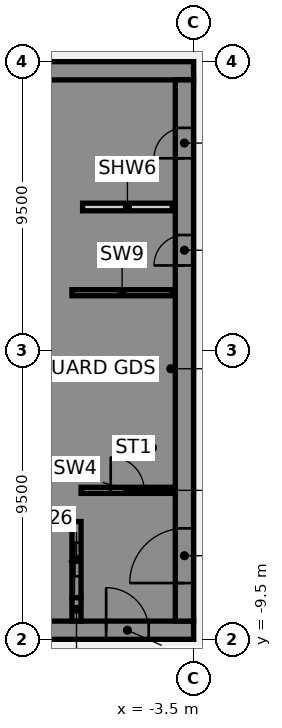
"""IFC4 building model, lengths in metres.
Left out: names, types, materials, properties, quantities, classifications, styles, units other than length and angle.
Written with IfcOpenShell. Run it as: python <this file> out.ifc"""

import sys

from ifc_helpers import new_model, si_unit, direction, frame, frame_2d, origin, place, context, subcontext, project, spatial, polyline, rectangle, outline, extrude, element, fill, save


model = new_model("IFC4")
c1 = context("Model", 3, precision=1e-05, world=origin(), true_north=direction((0.0, 1.0)))
c2 = subcontext(c1, "Body", "Model", "MODEL_VIEW")
j1 = project(units=[si_unit("LENGTHUNIT", "METRE"), si_unit("PLANEANGLEUNIT", "RADIAN")], contexts=[c1])
p1 = place(None, origin())
s1 = spatial("IfcSite", under=j1, at=p1, CompositionType="ELEMENT")
p2 = place(p1, origin())
s2 = spatial("IfcBuilding", under=s1, at=p2, CompositionType="ELEMENT")
p3 = place(p2, frame((0.0, 0.0, 109.75)))
s3 = spatial("IfcBuildingStorey", under=s2, at=p3, CompositionType="ELEMENT", Elevation=109.75)
p4 = place(p3, frame((-16.5, -9.2, 0.0), z_axis=(0.0, 0.0, 1.0), x_axis=(1.0, 0.0, 0.0)))
e1 = element("IfcWall", 1, at=p4, inside=s3, PredefinedType="SHEAR", context=c2, shape_type="SweptSolid", body=[
    extrude(rectangle(XDim=13.0, YDim=0.6, at=frame_2d((6.5, 0.0))), origin(), (0.0, 0.0, 1.0), 3.61),
])
p5 = place(p4, frame((4.15, 0.0, 0.0)))
e2 = element("IfcOpeningElement", 2, at=p5, cuts=e1, PredefinedType="OPENING", context=c2, shape_type="SweptSolid", body=[
    extrude(rectangle(XDim=1.4, YDim=2.1, at=frame_2d((0.7, 1.05))), frame((0.0, 0.31, 0.0), z_axis=(0.0, -1.0, 0.0), x_axis=(1.0, 0.0, 0.0)), (0.0, 0.0, 1.0), 0.62),
])
p6 = place(p4, frame((10.125, 0.0, 0.0)))
e3 = element("IfcOpeningElement", 3, at=p6, cuts=e1, PredefinedType="OPENING", context=c2, shape_type="SweptSolid", body=[
    extrude(rectangle(XDim=1.4, YDim=2.1, at=frame_2d((0.7, 1.05))), frame((0.0, 0.31, 0.0), z_axis=(0.0, -1.0, 0.0), x_axis=(1.0, 0.0, 0.0)), (0.0, 0.0, 1.0), 0.62),
])
p7 = place(p3, frame((-16.5, 9.2, 0.0), z_axis=(0.0, 0.0, 1.0), x_axis=(1.0, 0.0, 0.0)))
e4 = element("IfcWall", 4, at=p7, inside=s3, PredefinedType="SHEAR", context=c2, shape_type="SweptSolid", body=[
    extrude(rectangle(XDim=13.0, YDim=0.6, at=frame_2d((6.5, 0.0))), origin(), (0.0, 0.0, 1.0), 3.61),
])
p8 = place(p3, origin())
e5 = element("IfcWall", 5, at=p8, inside=s3, PredefinedType="SHEAR", context=c2, shape_type="SweptSolid", body=[
    extrude(outline(polyline([(-9.8, -5.375), (-9.8, -5.625), (-7.5, -5.625), (-7.2, -5.625), (-7.2, 8.9), (-7.5, 8.9), (-9.8, 8.9), (-9.8, 8.125), (-7.5, 8.125), (-7.5, 5.625), (-9.8, 5.625), (-9.8, 5.375), (-7.5, 5.375), (-7.5, 2.875), (-9.8, 2.875), (-9.8, 2.625), (-7.5, 2.625), (-7.5, 0.125), (-9.8, 0.125), (-9.8, -0.125), (-7.5, -0.125), (-7.5, -2.625), (-9.8, -2.625), (-9.8, -2.875), (-7.5, -2.875), (-7.5, -5.375), (-9.8, -5.375)])), origin(), (0.0, 0.0, 1.0), 3.61),
])
p9 = place(p3, origin())
e6 = element("IfcWall", 6, at=p9, inside=s3, PredefinedType="SHEAR", context=c2, shape_type="SweptSolid", body=[
    extrude(outline(polyline([(-7.5, -8.125), (-9.55, -8.125), (-9.55, -5.625), (-9.8, -5.625), (-9.8, -8.125), (-9.8, -8.9), (-7.5, -8.9), (-7.5, -8.125)])), origin(), (0.0, 0.0, 1.0), 3.61),
])
p10 = place(p3, frame((-7.35, -8.9, 0.0), z_axis=(0.0, 0.0, 1.0), x_axis=(0.0, 1.0, 0.0)))
e7 = element("IfcWall", 7, at=p10, inside=s3, PredefinedType="SHEAR", context=c2, shape_type="SweptSolid", body=[
    extrude(rectangle(XDim=0.775, YDim=0.3, at=frame_2d((0.387, 0.0))), origin(), (0.0, 0.0, 1.0), 3.61),
])
p11 = place(p3, frame((-7.5, 1.9, 0.0), z_axis=(0.0, 0.0, 1.0), x_axis=(1.0, 0.0, 0.0)))
e8 = element("IfcWall", 8, at=p11, inside=s3, PredefinedType="SHEAR", context=c2, shape_type="SweptSolid", body=[
    extrude(rectangle(XDim=3.3, YDim=0.2, at=frame_2d((1.65, 0.0))), origin(), (0.0, 0.0, 1.0), 3.61),
])
p12 = place(p3, frame((-7.35, -8.125, 0.0), z_axis=(0.0, 0.0, 1.0), x_axis=(0.0, 1.0, 0.0)))
e9 = element("IfcWall", 9, at=p12, inside=s3, PredefinedType="SHEAR", context=c2, shape_type="SweptSolid", body=[
    extrude(rectangle(XDim=2.5, YDim=0.3, at=frame_2d((1.25, 0.0))), origin(), (0.0, 0.0, 1.0), 3.61),
])
p13 = place(p12, frame((0.7, 0.0, 0.0)))
e10 = element("IfcOpeningElement", 10, at=p13, cuts=e9, PredefinedType="OPENING", context=c2, shape_type="SweptSolid", body=[
    extrude(rectangle(XDim=1.1, YDim=2.1, at=frame_2d((0.55, 1.05))), frame((0.0, 0.16, 0.0), z_axis=(0.0, -1.0, 0.0), x_axis=(1.0, 0.0, 0.0)), (0.0, 0.0, 1.0), 0.32),
])
p14 = place(p3, frame((-3.8, -8.9, 0.0), z_axis=(0.0, 0.0, 1.0), x_axis=(0.0, 1.0, 0.0)))
e11 = element("IfcWall", 11, at=p14, inside=s3, PredefinedType="SHEAR", context=c2, shape_type="SweptSolid", body=[
    extrude(rectangle(XDim=17.8, YDim=0.6, at=frame_2d((8.9, 0.0))), origin(), (0.0, 0.0, 1.0), 3.61),
])
p15 = place(p14, frame((1.25, 0.0, 0.0)))
e12 = element("IfcOpeningElement", 12, at=p15, cuts=e11, PredefinedType="OPENING", context=c2, shape_type="SweptSolid", body=[
    extrude(rectangle(XDim=1.8, YDim=2.1, at=frame_2d((0.9, 1.05))), frame((0.0, 0.31, 0.0), z_axis=(0.0, -1.0, 0.0), x_axis=(1.0, 0.0, 0.0)), (0.0, 0.0, 1.0), 0.62),
])
p16 = place(p14, frame((11.698, 0.0, 0.0)))
e13 = element("IfcOpeningElement", 13, at=p16, cuts=e11, PredefinedType="OPENING", context=c2, shape_type="SweptSolid", body=[
    extrude(rectangle(XDim=1.0, YDim=2.1, at=frame_2d((0.5, 1.05))), frame((0.0, 0.31, 0.0), z_axis=(0.0, -1.0, 0.0), x_axis=(1.0, 0.0, 0.0)), (0.0, 0.0, 1.0), 0.62),
])
p17 = place(p14, frame((15.222, 0.0, 0.0)))
e14 = element("IfcOpeningElement", 14, at=p17, cuts=e11, PredefinedType="OPENING", context=c2, shape_type="SweptSolid", body=[
    extrude(rectangle(XDim=1.0, YDim=2.1, at=frame_2d((0.5, 1.05))), frame((0.0, 0.31, 0.0), z_axis=(0.0, -1.0, 0.0), x_axis=(1.0, 0.0, 0.0)), (0.0, 0.0, 1.0), 0.62),
])
p18 = place(p3, frame((-7.15, 4.72, 0.0), z_axis=(0.0, 0.0, 1.0), x_axis=(1.0, 0.0, 0.0)))
e15 = element("IfcWall", 15, at=p18, inside=s3, PredefinedType="PARTITIONING", context=c2, shape_type="SweptSolid", body=[
    extrude(rectangle(XDim=2.95, YDim=0.25, at=frame_2d((1.475, 0.0))), origin(), (0.0, 0.0, 1.0), 3.61),
])
p19 = place(p3, frame((-7.2, -4.6, 0.0), z_axis=(0.0, 0.0, 1.0), x_axis=(1.0, 0.0, 0.0)))
e16 = element("IfcWall", 16, at=p19, inside=s3, PredefinedType="SHEAR", context=c2, shape_type="SweptSolid", body=[
    extrude(rectangle(XDim=3.1, YDim=0.2, at=frame_2d((1.55, 0.0))), origin(), (0.0, 0.0, 1.0), 3.61),
])
p20 = place(p19, frame((0.975, 0.0, 0.0)))
e17 = element("IfcOpeningElement", 17, at=p20, cuts=e16, PredefinedType="OPENING", context=c2, shape_type="SweptSolid", body=[
    extrude(rectangle(XDim=1.1, YDim=2.1, at=frame_2d((0.55, 1.05))), frame((0.0, 0.11, 0.0), z_axis=(0.0, -1.0, 0.0), x_axis=(1.0, 0.0, 0.0)), (0.0, 0.0, 1.0), 0.22),
])
p21 = place(p6, origin())
e18 = element("IfcDoor", 18, at=p21, inside=s3, OperationType="SINGLE_SWING_LEFT", PredefinedType="DOOR", context=c2, shape_type="SweptSolid", body=[
    extrude(rectangle(XDim=1.4, YDim=2.1, at=frame_2d((0.7, 1.05))), frame((0.0, 0.025, 0.0), z_axis=(0.0, -1.0, 0.0), x_axis=(1.0, 0.0, 0.0)), (0.0, 0.0, 1.0), 0.05),
])
fill(e3, e18)
p22 = place(p15, origin())
e19 = element("IfcDoor", 19, at=p22, inside=s3, OperationType="SINGLE_SWING_LEFT", PredefinedType="DOOR", context=c2, shape_type="SweptSolid", body=[
    extrude(rectangle(XDim=1.8, YDim=2.1, at=frame_2d((0.9, 1.05))), frame((0.0, 0.025, 0.0), z_axis=(0.0, -1.0, 0.0), x_axis=(1.0, 0.0, 0.0)), (0.0, 0.0, 1.0), 0.05),
])
fill(e12, e19)
p23 = place(p16, origin())
e20 = element("IfcDoor", 20, at=p23, inside=s3, OperationType="SINGLE_SWING_LEFT", PredefinedType="DOOR", context=c2, shape_type="SweptSolid", body=[
    extrude(rectangle(XDim=1.0, YDim=2.1, at=frame_2d((0.5, 1.05))), frame((0.0, 0.275, 0.0), z_axis=(0.0, -1.0, 0.0), x_axis=(1.0, 0.0, 0.0)), (0.0, 0.0, 1.0), 0.05),
])
fill(e13, e20)
p24 = place(p17, origin())
e21 = element("IfcDoor", 21, at=p24, inside=s3, OperationType="SINGLE_SWING_LEFT", PredefinedType="DOOR", context=c2, shape_type="SweptSolid", body=[
    extrude(rectangle(XDim=1.0, YDim=2.1, at=frame_2d((0.5, 1.05))), frame((0.0, 0.275, 0.0), z_axis=(0.0, -1.0, 0.0), x_axis=(1.0, 0.0, 0.0)), (0.0, 0.0, 1.0), 0.05),
])
fill(e14, e21)
p25 = place(p20, origin())
e22 = element("IfcDoor", 22, at=p25, inside=s3, OperationType="SINGLE_SWING_LEFT", PredefinedType="DOOR", context=c2, shape_type="SweptSolid", body=[
    extrude(rectangle(XDim=1.1, YDim=2.1, at=frame_2d((0.55, 1.05))), frame((0.0, 0.025, 0.0), z_axis=(0.0, -1.0, 0.0), x_axis=(1.0, 0.0, 0.0)), (0.0, 0.0, 1.0), 0.05),
])
fill(e17, e22)
p26 = place(p13, origin())
e23 = element("IfcDoor", 23, at=p26, inside=s3, OperationType="SLIDING_TO_LEFT", PredefinedType="DOOR", context=c2, shape_type="SweptSolid", body=[
    extrude(rectangle(XDim=1.1, YDim=2.1, at=frame_2d((0.55, 1.05))), frame((0.0, 0.025, 0.0), z_axis=(0.0, -1.0, 0.0), x_axis=(1.0, 0.0, 0.0)), (0.0, 0.0, 1.0), 0.05),
])
fill(e10, e23)
save(model, sys.argv[1])
